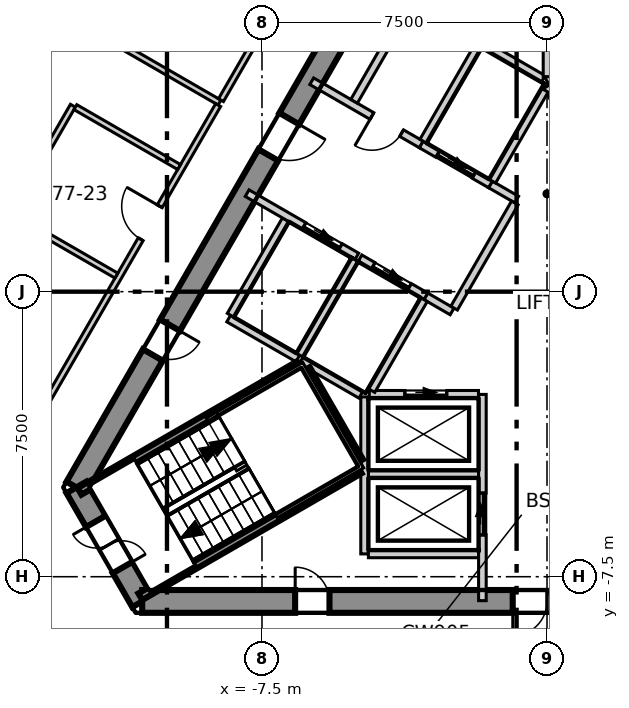
"""IFC4 building model, lengths in metres.
Left out: names, types, materials, properties, quantities, classifications, styles, units other than length and angle.
Written with IfcOpenShell. Run it as: python <this file> out.ifc"""

import sys

from ifc_helpers import new_model, si_unit, direction, frame, frame_2d, origin, place, context, subcontext, project, spatial, polyline, rectangle, outline, extrude, element, fill, save


model = new_model("IFC4")
c1 = context("Model", 3, precision=1e-05, world=origin(), true_north=direction((0.0, 1.0)))
c2 = subcontext(c1, "Body", "Model", "MODEL_VIEW")
j1 = project(units=[si_unit("LENGTHUNIT", "METRE"), si_unit("PLANEANGLEUNIT", "RADIAN")], contexts=[c1])
p1 = place(None, origin())
s1 = spatial("IfcSite", under=j1, at=p1, CompositionType="ELEMENT")
p2 = place(p1, origin())
s2 = spatial("IfcBuilding", under=s1, at=p2, CompositionType="ELEMENT")
p3 = place(p2, frame((0.0, 0.0, 322.3)))
s3 = spatial("IfcBuildingStorey", under=s2, at=p3, CompositionType="ELEMENT", Elevation=322.3)
p4 = place(p3, frame((-1.732, 13.3, -0.3), z_axis=(0.0, 0.0, 1.0), x_axis=(-0.500000539815, -0.866025092122, 0.0)))
e1 = element("IfcWall", 1, at=p4, inside=s3, PredefinedType="SHEAR", context=c2, shape_type="SweptSolid", body=[
    extrude(outline(polyline([(-0.173, -0.3), (1.795, -0.3), (3.763, -0.3), (5.732, -0.3), (7.7, -0.3), (9.668, -0.301), (11.637, -0.301), (13.605, -0.301), (15.573, -0.301), (17.542, -0.301), (19.51, -0.301), (21.478, -0.301), (21.131, 0.3), (19.226, 0.3), (17.321, 0.3), (15.415, 0.3), (13.51, 0.3), (11.605, 0.3), (9.699, 0.3), (7.794, 0.3), (5.889, 0.3), (3.984, 0.3), (2.078, 0.3), (0.173, 0.3), (-0.173, -0.3)])), origin(), (0.0, 0.0, 1.0), 5.35),
])
p5 = place(p4, frame((10.102, 0.0, 0.3)))
e2 = element("IfcOpeningElement", 2, at=p5, cuts=e1, PredefinedType="OPENING", context=c2, shape_type="SweptSolid", body=[
    extrude(rectangle(XDim=1.1, YDim=2.1, at=frame_2d((0.55, 1.05))), frame((0.0, 0.31, 0.0), z_axis=(0.0, -1.0, 0.0), x_axis=(1.0, 0.0, 0.0)), (0.0, 0.0, 1.0), 0.621),
])
p6 = place(p4, frame((16.378, 0.0, 0.3)))
e3 = element("IfcOpeningElement", 3, at=p6, cuts=e1, PredefinedType="OPENING", context=c2, shape_type="SweptSolid", body=[
    extrude(rectangle(XDim=0.9, YDim=2.1, at=frame_2d((0.45, 1.05))), frame((0.0, 0.31, 0.0), z_axis=(0.0, -1.0, 0.0), x_axis=(1.0, 0.0, 0.0)), (0.0, 0.0, 1.0), 0.621),
])
p7 = place(p3, frame((-12.384, -5.15, -0.3), z_axis=(0.0, 0.0, 1.0), x_axis=(0.49997462182, -0.866040055388, 0.0)))
e4 = element("IfcWall", 4, at=p7, inside=s3, PredefinedType="SHEAR", context=c2, shape_type="SweptSolid", body=[
    extrude(outline(polyline([(-0.173, -0.301), (1.732, -0.301), (3.637, -0.3), (3.291, 0.3), (1.732, 0.3), (0.173, 0.3), (-0.173, -0.301)])), origin(), (0.0, 0.0, 1.0), 5.35),
])
p8 = place(p7, frame((1.032, 0.0, 0.3)))
e5 = element("IfcOpeningElement", 5, at=p8, cuts=e4, PredefinedType="OPENING", context=c2, shape_type="SweptSolid", body=[
    extrude(rectangle(XDim=1.4, YDim=2.1, at=frame_2d((0.7, 1.05))), frame((0.0, 0.31, 0.0), z_axis=(0.0, -1.0, 0.0), x_axis=(1.0, 0.0, 0.0)), (0.0, 0.0, 1.0), 0.621),
])
p9 = place(p3, frame((-10.652, -8.15, -0.3), z_axis=(0.0, 0.0, 1.0), x_axis=(1.0, 0.0, 0.0)))
e6 = element("IfcWall", 6, at=p9, inside=s3, PredefinedType="SHEAR", context=c2, shape_type="SweptSolid", body=[
    extrude(outline(polyline([(-0.173, -0.3), (1.795, -0.3), (3.763, -0.3), (5.731, -0.3), (7.7, -0.3), (9.668, -0.3), (11.636, -0.3), (13.604, -0.3), (15.573, -0.3), (17.541, -0.3), (19.509, -0.3), (21.477, -0.3), (21.131, 0.3), (19.226, 0.3), (17.321, 0.3), (15.415, 0.3), (13.51, 0.3), (11.605, 0.3), (9.699, 0.3), (7.794, 0.3), (5.889, 0.3), (3.984, 0.3), (2.078, 0.3), (0.173, 0.3), (-0.173, -0.3)])), origin(), (0.0, 0.0, 1.0), 5.35),
])
p10 = place(p9, frame((9.752, 0.0, 0.3)))
e7 = element("IfcOpeningElement", 7, at=p10, cuts=e6, PredefinedType="OPENING", context=c2, shape_type="SweptSolid", body=[
    extrude(rectangle(XDim=1.8, YDim=2.1, at=frame_2d((0.9, 1.05))), frame((0.0, 0.31, 0.0), z_axis=(0.0, -1.0, 0.0), x_axis=(1.0, 0.0, 0.0)), (0.0, 0.0, 1.0), 0.62),
])
p11 = place(p9, frame((4.026, 0.0, 0.3)))
e8 = element("IfcOpeningElement", 8, at=p11, cuts=e6, PredefinedType="OPENING", context=c2, shape_type="SweptSolid", body=[
    extrude(rectangle(XDim=0.9, YDim=2.1, at=frame_2d((0.45, 1.05))), frame((0.0, 0.31, 0.0), z_axis=(0.0, -1.0, 0.0), x_axis=(1.0, 0.0, 0.0)), (0.0, 0.0, 1.0), 0.62),
])
p12 = place(p3, frame((-13.25, 7.65, 0.0), z_axis=(0.0, 0.0, 1.0), x_axis=(0.866032834954, -0.499987128616, 0.0)))
e9 = element("IfcWall", 9, at=p12, inside=s3, PredefinedType="PARTITIONING", context=c2, shape_type="SweptSolid", body=[
    extrude(rectangle(XDim=5.35, YDim=0.15, at=frame_2d((2.675, 0.0))), origin(), (0.0, 0.0, 1.0), 5.05),
])
p13 = place(p3, frame((-8.579, 5.04, 0.0), z_axis=(0.0, 0.0, 1.0), x_axis=(0.499960750514, 0.8660480633, 0.0)))
e10 = element("IfcWall", 10, at=p13, inside=s3, PredefinedType="PARTITIONING", context=c2, shape_type="SweptSolid", body=[
    extrude(rectangle(XDim=11.529, YDim=0.15, at=frame_2d((5.765, 0.0))), origin(), (0.0, 0.0, 1.0), 5.05),
])
p14 = place(p13, frame((5.17, 0.0, 0.0)))
e11 = element("IfcOpeningElement", 11, at=p14, cuts=e10, PredefinedType="OPENING", context=c2, shape_type="SweptSolid", body=[
    extrude(rectangle(XDim=1.2, YDim=2.1, at=frame_2d((0.6, 1.05))), frame((0.0, 0.085, 0.0), z_axis=(0.0, -1.0, 0.0), x_axis=(1.0, 0.0, 0.0)), (0.0, 0.0, 1.0), 0.17),
])
p15 = place(p3, frame((-14.463, -5.15, 0.0), z_axis=(0.0, 0.0, 1.0), x_axis=(0.50005173435, 0.865995532883, 0.0)))
e12 = element("IfcWall", 12, at=p15, inside=s3, PredefinedType="PARTITIONING", context=c2, shape_type="SweptSolid", body=[
    extrude(rectangle(XDim=11.616, YDim=0.15, at=frame_2d((5.808, 0.0))), origin(), (0.0, 0.0, 1.0), 5.05),
])
p16 = place(p15, frame((7.542, 0.0, 0.0)))
e13 = element("IfcOpeningElement", 13, at=p16, cuts=e12, PredefinedType="OPENING", context=c2, shape_type="SweptSolid", body=[
    extrude(rectangle(XDim=1.0, YDim=2.1, at=frame_2d((0.5, 1.05))), frame((0.0, 0.085, 0.0), z_axis=(0.0, -1.0, 0.0), x_axis=(1.0, 0.0, 0.0)), (0.0, 0.0, 1.0), 0.17),
])
for number, where, z_axis, x_axis in (
    (14, (-14.125, 2.035, 0.0), (0.0, 0.0, 1.0), (0.866, -0.5, 0.0)),
    (15, (-14.087, 2.1, 0.0), (0.0, 0.0, 1.0), (0.5, 0.866, 0.0)),
):
    element("IfcWall", number, at=place(p3, frame(where, z_axis=z_axis, x_axis=x_axis)), inside=s3, PredefinedType="PARTITIONING", context=c2, shape_type="SweptSolid", body=[
        extrude(rectangle(XDim=3.225, YDim=0.15, at=frame_2d((1.612, 0.0))), origin(), (0.0, 0.0, 1.0), 5.05),
    ])
p17 = place(p3, frame((-12.41, 4.855, 0.0), z_axis=(0.0, 0.0, 1.0), x_axis=(0.866035871367, -0.499981869177, 0.0)))
e16 = element("IfcWall", 16, at=p17, inside=s3, PredefinedType="PARTITIONING", context=c2, shape_type="SweptSolid", body=[
    extrude(rectangle(XDim=3.15, YDim=0.15, at=frame_2d((1.575, 0.0))), origin(), (0.0, 0.0, 1.0), 5.05),
])
p18 = place(p3, frame((-8.376, -0.707, 0.0), z_axis=(0.0, 0.0, 1.0), x_axis=(0.866067520717, -0.499927044236, 0.0)))
e17 = element("IfcWall", 17, at=p18, inside=s3, PredefinedType="SOLIDWALL", context=c2, shape_type="SweptSolid", body=[
    extrude(rectangle(XDim=2.1, YDim=0.2, at=frame_2d((1.05, 0.0))), origin(), (0.0, 0.0, 1.0), 5.05),
])
p19 = place(p3, frame((-8.326, -0.62, 0.0), z_axis=(0.0, 0.0, 1.0), x_axis=(0.500023687443, 0.866011727401, 0.0)))
e18 = element("IfcWall", 18, at=p19, inside=s3, PredefinedType="SOLIDWALL", context=c2, shape_type="SweptSolid", body=[
    extrude(rectangle(XDim=2.9, YDim=0.2, at=frame_2d((1.45, 0.0))), origin(), (0.0, 0.0, 1.0), 5.05),
])
p20 = place(p3, frame((-4.7, -4.8, 0.0), z_axis=(0.0, 0.0, 1.0), x_axis=(1.0, 0.0, 0.0)))
e19 = element("IfcWall", 19, at=p20, inside=s3, PredefinedType="SOLIDWALL", context=c2, shape_type="SweptSolid", body=[
    extrude(rectangle(XDim=2.9, YDim=0.2, at=frame_2d((1.45, 0.0))), origin(), (0.0, 0.0, 1.0), 5.05),
])
p21 = place(p3, frame((-4.8, -6.9, 0.0), z_axis=(0.0, 0.0, 1.0), x_axis=(0.0, 1.0, 0.0)))
e20 = element("IfcWall", 20, at=p21, inside=s3, PredefinedType="SOLIDWALL", context=c2, shape_type="SweptSolid", body=[
    extrude(rectangle(XDim=4.131, YDim=0.2, at=frame_2d((2.065, 0.0))), origin(), (0.0, 0.0, 1.0), 5.05),
])
p22 = place(p3, frame((-4.7, -6.9, 0.0), z_axis=(0.0, 0.0, 1.0), x_axis=(1.0, 0.0, 0.0)))
e21 = element("IfcWall", 21, at=p22, inside=s3, PredefinedType="SOLIDWALL", context=c2, shape_type="SweptSolid", body=[
    extrude(rectangle(XDim=2.9, YDim=0.2, at=frame_2d((1.45, 0.0))), origin(), (0.0, 0.0, 1.0), 5.05),
])
p23 = place(p3, frame((-1.7, -8.13, 0.0), z_axis=(0.0, 0.0, 1.0), x_axis=(0.0, 1.0, 0.0)))
e22 = element("IfcWall", 22, at=p23, inside=s3, PredefinedType="SOLIDWALL", context=c2, shape_type="SweptSolid", body=[
    extrude(rectangle(XDim=5.427, YDim=0.2, at=frame_2d((2.713, 0.0))), origin(), (0.0, 0.0, 1.0), 5.05),
])
p24 = place(p23, frame((1.73, 0.0, 0.0)))
e23 = element("IfcOpeningElement", 23, at=p24, cuts=e22, PredefinedType="OPENING", context=c2, shape_type="SweptSolid", body=[
    extrude(rectangle(XDim=1.1, YDim=2.1, at=frame_2d((0.55, 1.05))), frame((0.0, 0.11, 0.0), z_axis=(0.0, -1.0, 0.0), x_axis=(1.0, 0.0, 0.0)), (0.0, 0.0, 1.0), 0.22),
])
p25 = place(p3, frame((-4.676, -2.7, 0.0), z_axis=(0.0, 0.0, 1.0), x_axis=(1.0, 0.0, 0.0)))
e24 = element("IfcWall", 24, at=p25, inside=s3, PredefinedType="SOLIDWALL", context=c2, shape_type="SweptSolid", body=[
    extrude(rectangle(XDim=2.873, YDim=0.2, at=frame_2d((1.437, 0.0))), origin(), (0.0, 0.0, 1.0), 5.05),
])
p26 = place(p25, frame((0.937, 0.0, 0.0)))
e25 = element("IfcOpeningElement", 25, at=p26, cuts=e24, PredefinedType="OPENING", context=c2, shape_type="SweptSolid", body=[
    extrude(rectangle(XDim=1.1, YDim=2.1, at=frame_2d((0.55, 1.05))), frame((0.0, 0.11, 0.0), z_axis=(0.0, -1.0, 0.0), x_axis=(1.0, 0.0, 0.0)), (0.0, 0.0, 1.0), 0.22),
])
p27 = place(p3, frame((-0.002, 5.542, 0.0), z_axis=(0.0, 0.0, 1.0), x_axis=(0.866103910842, 0.499863997127, 0.0)))
e26 = element("IfcWall", 26, at=p27, inside=s3, PredefinedType="SOLIDWALL", context=c2, shape_type="SweptSolid", body=[
    extrude(rectangle(XDim=4.131, YDim=0.2, at=frame_2d((2.065, 0.0))), origin(), (0.0, 0.0, 1.0), 5.05),
])
p28 = place(p3, frame((0.0, 5.4, 0.0), z_axis=(0.0, 0.0, 1.0), x_axis=(0.500103862429, -0.865965430478, 0.0)))
e27 = element("IfcWall", 27, at=p28, inside=s3, PredefinedType="SOLIDWALL", context=c2, shape_type="SweptSolid", body=[
    extrude(rectangle(XDim=2.973, YDim=0.2, at=frame_2d((1.487, 0.0))), origin(), (0.0, 0.0, 1.0), 5.05),
])
p29 = place(p28, frame((0.937, 0.0, 0.0)))
e28 = element("IfcOpeningElement", 28, at=p29, cuts=e27, PredefinedType="OPENING", context=c2, shape_type="SweptSolid", body=[
    extrude(rectangle(XDim=1.1, YDim=2.1, at=frame_2d((0.55, 1.05))), frame((0.0, 0.11, 0.0), z_axis=(0.0, -1.0, 0.0), x_axis=(1.0, 0.0, 0.0)), (0.0, 0.0, 1.0), 0.22),
])
p30 = place(p3, frame((-7.891, 2.593, 0.0), z_axis=(0.0, 0.0, 1.0), x_axis=(0.866070917804, -0.499921159118, 0.0)))
e29 = element("IfcWall", 29, at=p30, inside=s3, PredefinedType="SOLIDWALL", context=c2, shape_type="SweptSolid", body=[
    extrude(rectangle(XDim=3.333, YDim=0.2, at=frame_2d((1.666, 0.0))), origin(), (0.0, 0.0, 1.0), 5.05),
])
p31 = place(p30, frame((1.73, 0.0, 0.0)))
e30 = element("IfcOpeningElement", 30, at=p31, cuts=e29, PredefinedType="OPENING", context=c2, shape_type="SweptSolid", body=[
    extrude(rectangle(XDim=1.1, YDim=2.1, at=frame_2d((0.55, 1.05))), frame((0.0, 0.11, 0.0), z_axis=(0.0, -1.0, 0.0), x_axis=(1.0, 0.0, 0.0)), (0.0, 0.0, 1.0), 0.22),
])
p32 = place(p3, frame((-3.188, -0.122, 0.0), z_axis=(0.0, 0.0, 1.0), x_axis=(0.865705793592, -0.50055317294, 0.0)))
e31 = element("IfcWall", 31, at=p32, inside=s3, PredefinedType="SOLIDWALL", context=c2, shape_type="SweptSolid", body=[
    extrude(rectangle(XDim=0.797, YDim=0.2, at=frame_2d((0.398, 0.0))), origin(), (0.0, 0.0, 1.0), 5.05),
])
p33 = place(p3, frame((-6.191, 5.537, 0.0), z_axis=(0.0, 0.0, 1.0), x_axis=(0.866052607023, -0.499952879648, 0.0)))
e32 = element("IfcWall", 32, at=p33, inside=s3, PredefinedType="SOLIDWALL", context=c2, shape_type="SweptSolid", body=[
    extrude(rectangle(XDim=3.332, YDim=0.2, at=frame_2d((1.666, 0.0))), origin(), (0.0, 0.0, 1.0), 5.05),
])
p34 = place(p33, frame((1.83, 0.0, 0.0)))
e33 = element("IfcOpeningElement", 33, at=p34, cuts=e32, PredefinedType="OPENING", context=c2, shape_type="SweptSolid", body=[
    extrude(rectangle(XDim=0.9, YDim=2.1, at=frame_2d((0.45, 1.05))), frame((0.0, 0.11, 0.0), z_axis=(0.0, -1.0, 0.0), x_axis=(1.0, 0.0, 0.0)), (0.0, 0.0, 1.0), 0.22),
])
p35 = place(p3, frame((-1.488, 2.822, 0.0), z_axis=(0.0, 0.0, 1.0), x_axis=(0.866236612152, -0.499633997809, 0.0)))
e34 = element("IfcWall", 34, at=p35, inside=s3, PredefinedType="SOLIDWALL", context=c2, shape_type="SweptSolid", body=[
    extrude(rectangle(XDim=0.796, YDim=0.2, at=frame_2d((0.398, 0.0))), origin(), (0.0, 0.0, 1.0), 5.05),
])
p36 = place(p3, frame((-5.076, 5.009, 0.0), z_axis=(0.0, 0.0, 1.0), x_axis=(0.50002537861, 0.866010750942, 0.0)))
e35 = element("IfcWall", 35, at=p36, inside=s3, PredefinedType="SOLIDWALL", context=c2, shape_type="SweptSolid", body=[
    extrude(rectangle(XDim=3.0, YDim=0.2, at=frame_2d((1.5, 0.0))), origin(), (0.0, 0.0, 1.0), 5.05),
])
p37 = place(p3, frame((-2.444, -0.433, 0.0), z_axis=(0.0, 0.0, 1.0), x_axis=(0.500035624827, 0.866004834804, 0.0)))
e36 = element("IfcWall", 36, at=p37, inside=s3, PredefinedType="SOLIDWALL", context=c2, shape_type="SweptSolid", body=[
    extrude(rectangle(XDim=3.194, YDim=0.2, at=frame_2d((1.597, 0.0))), origin(), (0.0, 0.0, 1.0), 5.05),
])
p38 = place(p3, frame((-6.507, -1.67, 0.0), z_axis=(0.0, 0.0, 1.0), x_axis=(0.50012328804, 0.865954211699, 0.0)))
e37 = element("IfcWall", 37, at=p38, inside=s3, PredefinedType="SOLIDWALL", context=c2, shape_type="SweptSolid", body=[
    extrude(rectangle(XDim=2.9, YDim=0.2, at=frame_2d((1.45, 0.0))), origin(), (0.0, 0.0, 1.0), 5.05),
])
p39 = place(p3, frame((-6.47, -1.807, 0.0), z_axis=(0.0, 0.0, 1.0), x_axis=(0.865883195159, -0.500246231712, 0.0)))
e38 = element("IfcWall", 38, at=p39, inside=s3, PredefinedType="SOLIDWALL", context=c2, shape_type="SweptSolid", body=[
    extrude(rectangle(XDim=1.815, YDim=0.2, at=frame_2d((0.908, 0.0))), origin(), (0.0, 0.0, 1.0), 5.05),
])
p40 = place(p3, frame((-4.922, 0.879, 0.0), z_axis=(0.0, 0.0, 1.0), x_axis=(0.866073918653, -0.499915960366, 0.0)))
e39 = element("IfcWall", 39, at=p40, inside=s3, PredefinedType="SOLIDWALL", context=c2, shape_type="SweptSolid", body=[
    extrude(rectangle(XDim=2.002, YDim=0.2, at=frame_2d((1.001, 0.0))), origin(), (0.0, 0.0, 1.0), 5.05),
])
p41 = place(p40, frame((0.402, 0.0, 0.0)))
e40 = element("IfcOpeningElement", 40, at=p41, cuts=e39, PredefinedType="OPENING", context=c2, shape_type="SweptSolid", body=[
    extrude(rectangle(XDim=1.1, YDim=2.1, at=frame_2d((0.55, 1.05))), frame((0.0, 0.11, 0.0), z_axis=(0.0, -1.0, 0.0), x_axis=(1.0, 0.0, 0.0)), (0.0, 0.0, 1.0), 0.22),
])
p42 = place(p3, frame((-4.619, -2.6, 0.0), z_axis=(0.0, 0.0, 1.0), x_axis=(0.50009492287, 0.865970593103, 0.0)))
e41 = element("IfcWall", 41, at=p42, inside=s3, PredefinedType="SOLIDWALL", context=c2, shape_type="SweptSolid", body=[
    extrude(rectangle(XDim=2.761, YDim=0.2, at=frame_2d((1.381, 0.0))), origin(), (0.0, 0.0, 1.0), 5.05),
])
p43 = place(p3, frame((-3.309, 3.873, 0.0), z_axis=(0.0, 0.0, 1.0), x_axis=(0.866098583652, -0.499873227325, 0.0)))
e42 = element("IfcWall", 42, at=p43, inside=s3, PredefinedType="SOLIDWALL", context=c2, shape_type="SweptSolid", body=[
    extrude(rectangle(XDim=2.103, YDim=0.2, at=frame_2d((1.051, 0.0))), origin(), (0.0, 0.0, 1.0), 5.05),
])
p44 = place(p43, frame((0.502, 0.0, 0.0)))
e43 = element("IfcOpeningElement", 43, at=p44, cuts=e42, PredefinedType="OPENING", context=c2, shape_type="SweptSolid", body=[
    extrude(rectangle(XDim=1.1, YDim=2.1, at=frame_2d((0.55, 1.05))), frame((0.0, 0.11, 0.0), z_axis=(0.0, -1.0, 0.0), x_axis=(1.0, 0.0, 0.0)), (0.0, 0.0, 1.0), 0.22),
])
p45 = place(p3, frame((-3.257, 3.959, 0.0), z_axis=(0.0, 0.0, 1.0), x_axis=(0.50012328804, 0.865954211699, 0.0)))
e44 = element("IfcWall", 44, at=p45, inside=s3, PredefinedType="SOLIDWALL", context=c2, shape_type="SweptSolid", body=[
    extrude(rectangle(XDim=2.9, YDim=0.2, at=frame_2d((1.45, 0.0))), origin(), (0.0, 0.0, 1.0), 5.05),
])
p46 = place(p3, frame((-1.67, 6.507, 0.0), z_axis=(0.0, 0.0, 1.0), x_axis=(0.865941441609, -0.500145398563, 0.0)))
e45 = element("IfcWall", 45, at=p46, inside=s3, PredefinedType="SOLIDWALL", context=c2, shape_type="SweptSolid", body=[
    extrude(rectangle(XDim=1.815, YDim=0.2, at=frame_2d((0.908, 0.0))), origin(), (0.0, 0.0, 1.0), 5.05),
])
p47 = place(p3, frame((-1.438, 2.909, 0.0), z_axis=(0.0, 0.0, 1.0), x_axis=(0.499829630636, 0.866123744241, 0.0)))
e46 = element("IfcWall", 46, at=p47, inside=s3, PredefinedType="SOLIDWALL", context=c2, shape_type="SweptSolid", body=[
    extrude(rectangle(XDim=2.761, YDim=0.2, at=frame_2d((1.38, 0.0))), origin(), (0.0, 0.0, 1.0), 5.05),
])
p48 = place(p3, frame((0.0, 5.658, 0.0), z_axis=(0.0, 0.0, 1.0), x_axis=(0.0, 1.0, 0.0)))
e47 = element("IfcWall", 47, at=p48, inside=s3, PredefinedType="SOLIDWALL", context=c2, shape_type="SweptSolid", body=[
    extrude(rectangle(XDim=0.742, YDim=0.2, at=frame_2d((0.371, 0.0))), origin(), (0.0, 0.0, 1.0), 5.05),
])
p49 = place(p3, frame((-12.301, -5.254, 0.0), z_axis=(0.0, 0.0, 1.0), x_axis=(0.866068467981, 0.499925403204, 0.0)))
e48 = element("IfcWall", 48, at=p49, inside=s3, PredefinedType="SOLIDWALL", context=c2, shape_type="SweptSolid", body=[
    extrude(rectangle(XDim=6.665, YDim=0.2, at=frame_2d((3.332, 0.0))), origin(), (0.0, 0.0, 1.0), 5.05),
])
p50 = place(p3, frame((-6.329, -2.038, 0.0), z_axis=(0.0, 0.0, 1.0), x_axis=(0.500200581029, -0.865909567298, 0.0)))
e49 = element("IfcWall", 49, at=p50, inside=s3, PredefinedType="SOLIDWALL", context=c2, shape_type="SweptSolid", body=[
    extrude(rectangle(XDim=2.799, YDim=0.2, at=frame_2d((1.399, 0.0))), origin(), (0.0, 0.0, 1.0), 5.05),
])
p51 = place(p3, frame((-10.701, -8.026, 0.0), z_axis=(0.0, 0.0, 1.0), x_axis=(0.866005022404, 0.500035299925, 0.0)))
e50 = element("IfcWall", 50, at=p51, inside=s3, PredefinedType="SOLIDWALL", context=c2, shape_type="SweptSolid", body=[
    extrude(rectangle(XDim=6.665, YDim=0.2, at=frame_2d((3.333, 0.0))), origin(), (0.0, 0.0, 1.0), 5.05),
])
p52 = place(p26, origin())
e51 = element("IfcDoor", 51, at=p52, inside=s3, OperationType="SLIDING_TO_LEFT", PredefinedType="DOOR", context=c2, shape_type="SweptSolid", body=[
    extrude(rectangle(XDim=1.1, YDim=2.1, at=frame_2d((0.55, 1.05))), frame((0.0, 0.025, 0.0), z_axis=(0.0, -1.0, 0.0), x_axis=(1.0, 0.0, 0.0)), (0.0, 0.0, 1.0), 0.05),
])
fill(e25, e51)
p53 = place(p24, origin())
e52 = element("IfcDoor", 52, at=p53, inside=s3, OperationType="SLIDING_TO_LEFT", PredefinedType="DOOR", context=c2, shape_type="SweptSolid", body=[
    extrude(rectangle(XDim=1.1, YDim=2.1, at=frame_2d((0.55, 1.05))), frame((0.0, 0.025, 0.0), z_axis=(0.0, -1.0, 0.0), x_axis=(1.0, 0.0, 0.0)), (0.0, 0.0, 1.0), 0.05),
])
fill(e23, e52)
p54 = place(p41, origin())
e53 = element("IfcDoor", 53, at=p54, inside=s3, OperationType="SLIDING_TO_LEFT", PredefinedType="DOOR", context=c2, shape_type="SweptSolid", body=[
    extrude(rectangle(XDim=1.1, YDim=2.1, at=frame_2d((0.55, 1.05))), frame((0.0, 0.025, 0.0), z_axis=(0.0, -1.0, 0.0), x_axis=(1.0, 0.0, 0.0)), (0.0, 0.0, 1.0), 0.05),
])
fill(e40, e53)
p55 = place(p44, origin())
e54 = element("IfcDoor", 54, at=p55, inside=s3, OperationType="SLIDING_TO_LEFT", PredefinedType="DOOR", context=c2, shape_type="SweptSolid", body=[
    extrude(rectangle(XDim=1.1, YDim=2.1, at=frame_2d((0.55, 1.05))), frame((0.0, 0.025, 0.0), z_axis=(0.0, -1.0, 0.0), x_axis=(1.0, 0.0, 0.0)), (0.0, 0.0, 1.0), 0.05),
])
fill(e43, e54)
p56 = place(p31, origin())
e55 = element("IfcDoor", 55, at=p56, inside=s3, OperationType="SLIDING_TO_LEFT", PredefinedType="DOOR", context=c2, shape_type="SweptSolid", body=[
    extrude(rectangle(XDim=1.1, YDim=2.1, at=frame_2d((0.55, 1.05))), frame((0.0, 0.025, 0.0), z_axis=(0.0, -1.0, 0.0), x_axis=(1.0, 0.0, 0.0)), (0.0, 0.0, 1.0), 0.05),
])
fill(e30, e55)
p57 = place(p34, origin())
e56 = element("IfcDoor", 56, at=p57, inside=s3, OperationType="SINGLE_SWING_LEFT", PredefinedType="DOOR", context=c2, shape_type="SweptSolid", body=[
    extrude(rectangle(XDim=0.9, YDim=2.1, at=frame_2d((0.45, 1.05))), frame((0.0, 0.025, 0.0), z_axis=(0.0, -1.0, 0.0), x_axis=(1.0, 0.0, 0.0)), (0.0, 0.0, 1.0), 0.05),
])
fill(e33, e56)
p58 = place(p16, origin())
e57 = element("IfcDoor", 57, at=p58, inside=s3, OperationType="SINGLE_SWING_LEFT", PredefinedType="DOOR", context=c2, shape_type="SweptSolid", body=[
    extrude(rectangle(XDim=1.0, YDim=2.1, at=frame_2d((0.5, 1.05))), frame((0.0, 0.025, 0.0), z_axis=(0.0, -1.0, 0.0), x_axis=(1.0, 0.0, 0.0)), (0.0, 0.0, 1.0), 0.05),
])
fill(e13, e57)
p59 = place(p10, origin())
e58 = element("IfcDoor", 58, at=p59, inside=s3, OperationType="DOUBLE_DOOR_SINGLE_SWING", PredefinedType="DOOR", context=c2, shape_type="SweptSolid", body=[
    extrude(rectangle(XDim=1.8, YDim=2.1, at=frame_2d((0.9, 1.05))), frame((0.0, 0.025, 0.0), z_axis=(0.0, -1.0, 0.0), x_axis=(1.0, 0.0, 0.0)), (0.0, 0.0, 1.0), 0.05),
])
fill(e7, e58)
p60 = place(p8, origin())
e59 = element("IfcDoor", 59, at=p60, inside=s3, OperationType="DOUBLE_DOOR_SINGLE_SWING", PredefinedType="DOOR", context=c2, shape_type="SweptSolid", body=[
    extrude(rectangle(XDim=1.4, YDim=2.1, at=frame_2d((0.7, 1.05))), frame((0.0, 0.025, 0.0), z_axis=(0.0, -1.0, 0.0), x_axis=(1.0, 0.0, 0.0)), (0.0, 0.0, 1.0), 0.05),
])
fill(e5, e59)
p61 = place(p5, origin())
e60 = element("IfcDoor", 60, at=p61, inside=s3, OperationType="SINGLE_SWING_RIGHT", PredefinedType="DOOR", context=c2, shape_type="SweptSolid", body=[
    extrude(rectangle(XDim=1.1, YDim=2.1, at=frame_2d((0.55, 1.05))), frame((0.0, 0.025, 0.0), z_axis=(0.0, -1.0, 0.0), x_axis=(1.0, 0.0, 0.0)), (0.0, 0.0, 1.0), 0.05),
])
fill(e2, e60)
p62 = place(p6, origin())
e61 = element("IfcDoor", 61, at=p62, inside=s3, OperationType="SINGLE_SWING_RIGHT", PredefinedType="DOOR", context=c2, shape_type="SweptSolid", body=[
    extrude(rectangle(XDim=0.9, YDim=2.1, at=frame_2d((0.45, 1.05))), frame((0.0, 0.025, 0.0), z_axis=(0.0, -1.0, 0.0), x_axis=(1.0, 0.0, 0.0)), (0.0, 0.0, 1.0), 0.05),
])
fill(e3, e61)
p63 = place(p11, origin())
e62 = element("IfcDoor", 62, at=p63, inside=s3, OperationType="SINGLE_SWING_RIGHT", PredefinedType="DOOR", context=c2, shape_type="SweptSolid", body=[
    extrude(rectangle(XDim=0.9, YDim=2.1, at=frame_2d((0.45, 1.05))), frame((0.0, 0.025, 0.0), z_axis=(0.0, -1.0, 0.0), x_axis=(1.0, 0.0, 0.0)), (0.0, 0.0, 1.0), 0.05),
])
fill(e8, e62)
save(model, sys.argv[1])
